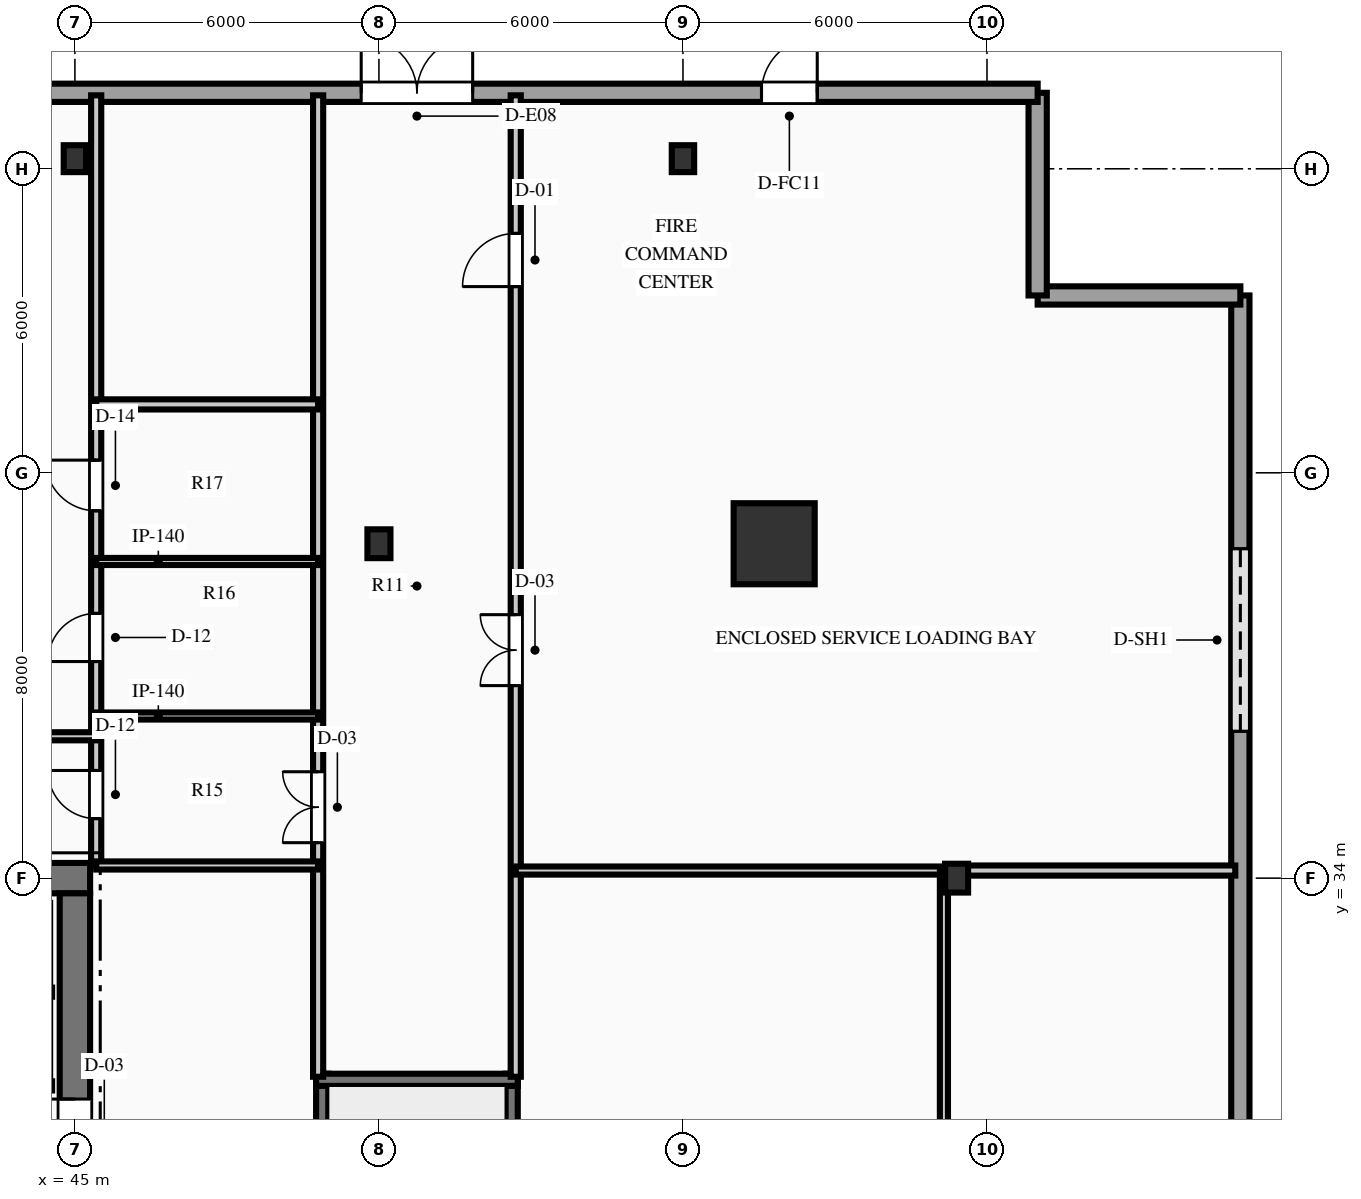
"""IFC4 building model, lengths in metres.
Left out: names, types, materials, properties, quantities, classifications, styles, units other than length and angle.
Written with IfcOpenShell. Run it as: python <this file> out.ifc"""

import sys

from ifc_helpers import new_model, si_unit, direction, frame, frame_2d, origin, origin_2d, place, context, subcontext, project, spatial, rectangle, hollow_rectangle, i_section, extrude, element, fill, save


model = new_model("IFC4")
c1 = context("Model", 3, precision=1e-05, world=origin(), true_north=direction((0.0, 1.0)))
c2 = subcontext(c1, "Body", "Model", "MODEL_VIEW")
j1 = project(units=[si_unit("LENGTHUNIT", "METRE"), si_unit("PLANEANGLEUNIT", "RADIAN")], contexts=[c1])
p1 = place(None, origin())
s1 = spatial("IfcSite", under=j1, at=p1, CompositionType="ELEMENT")
p2 = place(p1, origin())
s2 = spatial("IfcBuilding", under=s1, at=p2, CompositionType="ELEMENT")
p3 = place(p2, origin())
s3 = spatial("IfcBuildingStorey", under=s2, at=p3, CompositionType="ELEMENT", Elevation=0.0)
p4 = place(p3, frame((26.7, 34.0, 0.0), z_axis=(0.0, 0.0, 1.0), x_axis=(1.0, 0.0, 0.0)))
e1 = element("IfcWall", 1, at=p4, inside=s3, PredefinedType="SHEAR", context=c2, shape_type="SweptSolid", body=[
    extrude(rectangle(XDim=18.6, YDim=0.6, at=frame_2d((9.3, 0.0))), origin(), (0.0, 0.0, 1.0), 6.0),
])
p5 = place(p4, frame((5.595, 0.0, 0.0)))
e2 = element("IfcOpeningElement", 2, at=p5, cuts=e1, PredefinedType="OPENING", context=c2, shape_type="SweptSolid", body=[
    extrude(rectangle(XDim=1.05, YDim=2.15, at=frame_2d((0.525, 1.075))), frame((0.0, 0.31, 0.0), z_axis=(0.0, -1.0, 0.0), x_axis=(1.0, 0.0, 0.0)), (0.0, 0.0, 1.0), 0.62),
])
p6 = place(p4, frame((1.265, 0.0, 0.0)))
e3 = element("IfcOpeningElement", 3, at=p6, cuts=e1, PredefinedType="OPENING", context=c2, shape_type="SweptSolid", body=[
    extrude(rectangle(XDim=1.1, YDim=2.15, at=frame_2d((0.55, 1.075))), frame((0.0, 0.31, 0.0), z_axis=(0.0, -1.0, 0.0), x_axis=(1.0, 0.0, 0.0)), (0.0, 0.0, 1.0), 0.62),
])
p7 = place(p4, frame((3.515, 0.0, 0.0)))
e4 = element("IfcOpeningElement", 4, at=p7, cuts=e1, PredefinedType="OPENING", context=c2, shape_type="SweptSolid", body=[
    extrude(rectangle(XDim=1.1, YDim=2.15, at=frame_2d((0.55, 1.075))), frame((0.0, 0.31, 0.0), z_axis=(0.0, -1.0, 0.0), x_axis=(1.0, 0.0, 0.0)), (0.0, 0.0, 1.0), 0.62),
])
p8 = place(p4, frame((13.985, 0.0, 0.0)))
e5 = element("IfcOpeningElement", 5, at=p8, cuts=e1, PredefinedType="OPENING", context=c2, shape_type="SweptSolid", body=[
    extrude(rectangle(XDim=1.1, YDim=2.15, at=frame_2d((0.55, 1.075))), frame((0.0, 0.31, 0.0), z_axis=(0.0, -1.0, 0.0), x_axis=(1.0, 0.0, 0.0)), (0.0, 0.0, 1.0), 0.62),
])
p9 = place(p4, frame((16.235, 0.0, 0.0)))
e6 = element("IfcOpeningElement", 6, at=p9, cuts=e1, PredefinedType="OPENING", context=c2, shape_type="SweptSolid", body=[
    extrude(rectangle(XDim=1.1, YDim=2.15, at=frame_2d((0.55, 1.075))), frame((0.0, 0.31, 0.0), z_axis=(0.0, -1.0, 0.0), x_axis=(1.0, 0.0, 0.0)), (0.0, 0.0, 1.0), 0.62),
])
p10 = place(p3, frame((45.0, 18.3, 0.0), z_axis=(0.0, 0.0, 1.0), x_axis=(0.0, 1.0, 0.0)))
e7 = element("IfcWall", 7, at=p10, inside=s3, PredefinedType="SHEAR", context=c2, shape_type="SweptSolid", body=[
    extrude(rectangle(XDim=15.4, YDim=0.6, at=frame_2d((7.7, 0.0))), origin(), (0.0, 0.0, 1.0), 6.0),
])
p11 = place(p10, frame((9.94, 0.0, 0.0)))
e8 = element("IfcOpeningElement", 8, at=p11, cuts=e7, PredefinedType="OPENING", context=c2, shape_type="SweptSolid", body=[
    extrude(rectangle(XDim=1.4, YDim=2.2, at=frame_2d((0.7, 1.1))), frame((0.0, 0.31, 0.0), z_axis=(0.0, -1.0, 0.0), x_axis=(1.0, 0.0, 0.0)), (0.0, 0.0, 1.0), 0.62),
])
for number, where, z_axis, x_axis in (
    (9, (49.88, 21.76, 0.0), (0.0, 0.0, 1.0), (0.0, 1.0, 0.0)),
    (10, (53.62, 21.76, 0.0), (0.0, 0.0, 1.0), (0.0, 1.0, 0.0)),
):
    element("IfcWall", number, at=place(p3, frame(where, z_axis=z_axis, x_axis=x_axis)), inside=s3, PredefinedType="SHEAR", context=c2, shape_type="SweptSolid", body=[
        extrude(rectangle(XDim=8.38, YDim=0.24, at=frame_2d((4.19, 0.0))), origin(), (0.0, 0.0, 1.0), 6.0),
    ])
p12 = place(p3, frame((49.76, 30.02, 0.0), z_axis=(0.0, 0.0, 1.0), x_axis=(1.0, 0.0, 0.0)))
e11 = element("IfcWall", 11, at=p12, inside=s3, PredefinedType="SHEAR", context=c2, shape_type="SweptSolid", body=[
    extrude(rectangle(XDim=3.98, YDim=0.24, at=frame_2d((1.99, 0.0))), origin(), (0.0, 0.0, 1.0), 6.0),
])
p13 = place(p3, frame((58.8, 40.6, 0.0), z_axis=(0.0, 0.0, 1.0), x_axis=(1.0, 0.0, 0.0)))
e12 = element("IfcColumn", 12, at=p13, inside=s3, PredefinedType="COLUMN", context=c2, shape_type="SweptSolid", body=[
    extrude(hollow_rectangle(XDim=1.6, YDim=1.6, WallThickness=0.08, at=origin_2d()), origin(), (0.0, 0.0, 1.0), 6.0),
])
for number, where, z_axis, x_axis in (
    (13, (62.4, 34.0, 0.0), (0.0, 0.0, 1.0), (1.0, 0.0, 0.0)),
    (14, (51.0, 40.6, 0.0), (0.0, 0.0, 1.0), (1.0, 0.0, 0.0)),
):
    element("IfcColumn", number, at=place(p3, frame(where, z_axis=z_axis, x_axis=x_axis)), inside=s3, PredefinedType="COLUMN", context=c2, shape_type="SweptSolid", body=[
        extrude(i_section(OverallWidth=0.454, OverallDepth=0.569, WebThickness=0.078, FlangeThickness=0.125, at=origin_2d()), origin(), (0.0, 0.0, 1.0), 6.0),
    ])
for number, where, z_axis, x_axis in (
    (15, (57.0, 48.2, 0.0), (0.0, 0.0, 1.0), (1.0, 0.0, 0.0)),
    (16, (45.0, 48.2, 0.0), (0.0, 0.0, 1.0), (1.0, 0.0, 0.0)),
):
    element("IfcColumn", number, at=place(p3, frame(where, z_axis=z_axis, x_axis=x_axis)), inside=s3, PredefinedType="PILASTER", context=c2, shape_type="SweptSolid", body=[
        extrude(i_section(OverallWidth=0.442, OverallDepth=0.531, WebThickness=0.066, FlangeThickness=0.106, at=origin_2d()), origin(), (0.0, 0.0, 1.0), 6.0),
    ])
p14 = place(p3, frame((68.0, 45.5, 0.0), z_axis=(0.0, 0.0, 1.0), x_axis=(0.0, -1.0, 0.0)))
e17 = element("IfcWall", 17, at=p14, inside=s3, PredefinedType="STANDARD", context=c2, shape_type="SweptSolid", body=[
    extrude(rectangle(XDim=39.0, YDim=0.36, at=frame_2d((19.5, 0.0))), origin(), (0.0, 0.0, 1.0), 5.67),
])
p15 = place(p14, frame((30.4, 0.0, 0.0)))
e18 = element("IfcOpeningElement", 18, at=p15, cuts=e17, PredefinedType="OPENING", context=c2, shape_type="SweptSolid", body=[
    extrude(rectangle(XDim=2.2, YDim=2.4, at=frame_2d((1.1, 1.2))), frame((0.0, 0.19, 0.0), z_axis=(0.0, -1.0, 0.0), x_axis=(1.0, 0.0, 0.0)), (0.0, 0.0, 1.0), 0.38),
])
p16 = place(p14, frame((20.3, 0.0, 0.0)))
e19 = element("IfcOpeningElement", 19, at=p16, cuts=e17, PredefinedType="OPENING", context=c2, shape_type="SweptSolid", body=[
    extrude(rectangle(XDim=2.4, YDim=2.6, at=frame_2d((1.2, 1.3))), frame((0.0, 0.19, 0.0), z_axis=(0.0, -1.0, 0.0), x_axis=(1.0, 0.0, 0.0)), (0.0, 0.0, 1.0), 0.38),
])
p17 = place(p14, frame((5.0, 0.0, 0.0)))
e20 = element("IfcOpeningElement", 20, at=p17, cuts=e17, PredefinedType="OPENING", context=c2, shape_type="SweptSolid", body=[
    extrude(rectangle(XDim=3.6, YDim=3.8, at=frame_2d((1.8, 1.9))), frame((0.0, 0.19, 0.0), z_axis=(0.0, -1.0, 0.0), x_axis=(1.0, 0.0, 0.0)), (0.0, 0.0, 1.0), 0.38),
])
for number, where, z_axis, x_axis in (
    (21, (64.0, 45.5, 0.0), (0.0, 0.0, 1.0), (1.0, 0.0, 0.0)),
    (22, (64.0, 49.5, 0.0), (0.0, 0.0, 1.0), (0.0, -1.0, 0.0)),
):
    element("IfcWall", number, at=place(p3, frame(where, z_axis=z_axis, x_axis=x_axis)), inside=s3, PredefinedType="STANDARD", context=c2, shape_type="SweptSolid", body=[
        extrude(rectangle(XDim=4.0, YDim=0.36, at=frame_2d((2.0, 0.0))), origin(), (0.0, 0.0, 1.0), 5.67),
    ])
p18 = place(p3, frame((8.0, 49.5, 0.0), z_axis=(0.0, 0.0, 1.0), x_axis=(1.0, 0.0, 0.0)))
e23 = element("IfcWall", 23, at=p18, inside=s3, PredefinedType="STANDARD", context=c2, shape_type="SweptSolid", body=[
    extrude(rectangle(XDim=56.0, YDim=0.36, at=frame_2d((28.0, 0.0))), origin(), (0.0, 0.0, 1.0), 5.67),
])
p19 = place(p18, frame((11.15, 0.0, 0.0)))
e24 = element("IfcOpeningElement", 24, at=p19, cuts=e23, PredefinedType="OPENING", context=c2, shape_type="SweptSolid", body=[
    extrude(rectangle(XDim=2.2, YDim=2.4, at=frame_2d((1.1, 1.2))), frame((0.0, 0.19, 0.0), z_axis=(0.0, -1.0, 0.0), x_axis=(1.0, 0.0, 0.0)), (0.0, 0.0, 1.0), 0.38),
])
p20 = place(p18, frame((42.65, 0.0, 0.0)))
e25 = element("IfcOpeningElement", 25, at=p20, cuts=e23, PredefinedType="OPENING", context=c2, shape_type="SweptSolid", body=[
    extrude(rectangle(XDim=2.2, YDim=2.4, at=frame_2d((1.1, 1.2))), frame((0.0, 0.19, 0.0), z_axis=(0.0, -1.0, 0.0), x_axis=(1.0, 0.0, 0.0)), (0.0, 0.0, 1.0), 0.38),
])
p21 = place(p18, frame((26.8, 0.0, 0.0)))
e26 = element("IfcOpeningElement", 26, at=p21, cuts=e23, PredefinedType="OPENING", context=c2, shape_type="SweptSolid", body=[
    extrude(rectangle(XDim=2.4, YDim=2.6, at=frame_2d((1.2, 1.3))), frame((0.0, 0.19, 0.0), z_axis=(0.0, -1.0, 0.0), x_axis=(1.0, 0.0, 0.0)), (0.0, 0.0, 1.0), 0.38),
])
p22 = place(p18, frame((50.55, 0.0, 0.0)))
e27 = element("IfcOpeningElement", 27, at=p22, cuts=e23, PredefinedType="OPENING", context=c2, shape_type="SweptSolid", body=[
    extrude(rectangle(XDim=1.1, YDim=2.2, at=frame_2d((0.55, 1.1))), frame((0.0, 0.19, 0.0), z_axis=(0.0, -1.0, 0.0), x_axis=(1.0, 0.0, 0.0)), (0.0, 0.0, 1.0), 0.38),
])
p23 = place(p3, frame((49.8, 30.08, 0.0), z_axis=(0.0, 0.0, 1.0), x_axis=(0.0, 1.0, 0.0)))
e28 = element("IfcWall", 28, at=p23, inside=s3, PredefinedType="PARTITIONING", context=c2, shape_type="SweptSolid", body=[
    extrude(rectangle(XDim=19.37, YDim=0.2, at=frame_2d((9.685, 0.0))), origin(), (0.0, 0.0, 1.0), 5.67),
])
p24 = place(p23, frame((4.62, 0.0, 0.0)))
e29 = element("IfcOpeningElement", 29, at=p24, cuts=e28, PredefinedType="OPENING", context=c2, shape_type="SweptSolid", body=[
    extrude(rectangle(XDim=1.4, YDim=2.2, at=frame_2d((0.7, 1.1))), frame((0.0, 0.11, 0.0), z_axis=(0.0, -1.0, 0.0), x_axis=(1.0, 0.0, 0.0)), (0.0, 0.0, 1.0), 0.22),
])
p25 = place(p3, frame((53.7, 30.08, 0.0), z_axis=(0.0, 0.0, 1.0), x_axis=(0.0, 1.0, 0.0)))
e30 = element("IfcWall", 30, at=p25, inside=s3, PredefinedType="PARTITIONING", context=c2, shape_type="SweptSolid", body=[
    extrude(rectangle(XDim=19.37, YDim=0.2, at=frame_2d((9.685, 0.0))), origin(), (0.0, 0.0, 1.0), 5.67),
])
p26 = place(p25, frame((15.595, 0.0, 0.0)))
e31 = element("IfcOpeningElement", 31, at=p26, cuts=e30, PredefinedType="OPENING", context=c2, shape_type="SweptSolid", body=[
    extrude(rectangle(XDim=1.05, YDim=2.15, at=frame_2d((0.525, 1.075))), frame((0.0, 0.11, 0.0), z_axis=(0.0, -1.0, 0.0), x_axis=(1.0, 0.0, 0.0)), (0.0, 0.0, 1.0), 0.22),
])
p27 = place(p25, frame((7.72, 0.0, 0.0)))
e32 = element("IfcOpeningElement", 32, at=p27, cuts=e30, PredefinedType="OPENING", context=c2, shape_type="SweptSolid", body=[
    extrude(rectangle(XDim=1.4, YDim=2.2, at=frame_2d((0.7, 1.1))), frame((0.0, 0.11, 0.0), z_axis=(0.0, -1.0, 0.0), x_axis=(1.0, 0.0, 0.0)), (0.0, 0.0, 1.0), 0.22),
])
p28 = place(p3, frame((53.7, 34.15, 0.0), z_axis=(0.0, 0.0, 1.0), x_axis=(1.0, 0.0, 0.0)))
e33 = element("IfcWall", 33, at=p28, inside=s3, PredefinedType="PARTITIONING", context=c2, shape_type="SweptSolid", body=[
    extrude(rectangle(XDim=8.45, YDim=0.16, at=frame_2d((4.225, 0.0))), origin(), (0.0, 0.0, 1.0), 4.803),
])
p29 = place(p3, frame((62.15, 17.85, 0.0), z_axis=(0.0, 0.0, 1.0), x_axis=(0.0, 1.0, 0.0)))
e34 = element("IfcWall", 34, at=p29, inside=s3, PredefinedType="PARTITIONING", context=c2, shape_type="SweptSolid", body=[
    extrude(rectangle(XDim=16.3, YDim=0.16, at=frame_2d((8.15, 0.0))), origin(), (0.0, 0.0, 1.0), 4.803),
])
p30 = place(p29, frame((7.35, 0.0, 0.0)))
e35 = element("IfcOpeningElement", 35, at=p30, cuts=e34, PredefinedType="OPENING", context=c2, shape_type="SweptSolid", body=[
    extrude(rectangle(XDim=1.6, YDim=2.2, at=frame_2d((0.8, 1.1))), frame((0.0, 0.09, 0.0), z_axis=(0.0, -1.0, 0.0), x_axis=(1.0, 0.0, 0.0)), (0.0, 0.0, 1.0), 0.18),
])
p31 = place(p3, frame((45.42, 34.25, 0.0), z_axis=(0.0, 0.0, 1.0), x_axis=(0.0, 1.0, 0.0)))
e36 = element("IfcWall", 36, at=p31, inside=s3, PredefinedType="PARTITIONING", context=c2, shape_type="SweptSolid", body=[
    extrude(rectangle(XDim=15.2, YDim=0.2, at=frame_2d((7.6, 0.0))), origin(), (0.0, 0.0, 1.0), 4.803),
])
p32 = place(p31, frame((0.925, 0.0, 0.0)))
e37 = element("IfcOpeningElement", 37, at=p32, cuts=e36, PredefinedType="OPENING", context=c2, shape_type="SweptSolid", body=[
    extrude(rectangle(XDim=0.95, YDim=2.15, at=frame_2d((0.475, 1.075))), frame((0.0, 0.11, 0.0), z_axis=(0.0, -1.0, 0.0), x_axis=(1.0, 0.0, 0.0)), (0.0, 0.0, 1.0), 0.22),
])
p33 = place(p31, frame((4.025, 0.0, 0.0)))
e38 = element("IfcOpeningElement", 38, at=p33, cuts=e36, PredefinedType="OPENING", context=c2, shape_type="SweptSolid", body=[
    extrude(rectangle(XDim=0.95, YDim=2.15, at=frame_2d((0.475, 1.075))), frame((0.0, 0.11, 0.0), z_axis=(0.0, -1.0, 0.0), x_axis=(1.0, 0.0, 0.0)), (0.0, 0.0, 1.0), 0.22),
])
p34 = place(p31, frame((7.0, 0.0, 0.0)))
e39 = element("IfcOpeningElement", 39, at=p34, cuts=e36, PredefinedType="OPENING", context=c2, shape_type="SweptSolid", body=[
    extrude(rectangle(XDim=1.0, YDim=2.15, at=frame_2d((0.5, 1.075))), frame((0.0, 0.11, 0.0), z_axis=(0.0, -1.0, 0.0), x_axis=(1.0, 0.0, 0.0)), (0.0, 0.0, 1.0), 0.22),
])
p35 = place(p3, frame((45.42, 43.35, 0.0), z_axis=(0.0, 0.0, 1.0), x_axis=(1.0, 0.0, 0.0)))
e40 = element("IfcWall", 40, at=p35, inside=s3, PredefinedType="PARTITIONING", context=c2, shape_type="SweptSolid", body=[
    extrude(rectangle(XDim=4.38, YDim=0.2, at=frame_2d((2.19, 0.0))), origin(), (0.0, 0.0, 1.0), 5.67),
])
p36 = place(p3, frame((45.42, 34.25, 0.0), z_axis=(0.0, 0.0, 1.0), x_axis=(1.0, 0.0, 0.0)))
e41 = element("IfcWall", 41, at=p36, inside=s3, PredefinedType="PARTITIONING", context=c2, shape_type="SweptSolid", body=[
    extrude(rectangle(XDim=4.38, YDim=0.16, at=frame_2d((2.19, 0.0))), origin(), (0.0, 0.0, 1.0), 4.803),
])
for number, where, z_axis, x_axis in (
    (42, (45.42, 37.2, 0.0), (0.0, 0.0, 1.0), (1.0, 0.0, 0.0)),
    (43, (45.42, 40.25, 0.0), (0.0, 0.0, 1.0), (1.0, 0.0, 0.0)),
):
    element("IfcWall", number, at=place(p3, frame(where, z_axis=z_axis, x_axis=x_axis)), inside=s3, PredefinedType="PARTITIONING", context=c2, shape_type="SweptSolid", body=[
        extrude(rectangle(XDim=4.38, YDim=0.14, at=frame_2d((2.19, 0.0))), origin(), (0.0, 0.0, 1.0), 5.67),
    ])
p37 = place(p3, frame((22.2, 36.8, 0.0), z_axis=(0.0, 0.0, 1.0), x_axis=(1.0, 0.0, 0.0)))
e44 = element("IfcWall", 44, at=p37, inside=s3, PredefinedType="PARTITIONING", context=c2, shape_type="SweptSolid", body=[
    extrude(rectangle(XDim=23.22, YDim=0.16, at=frame_2d((11.61, 0.0))), origin(), (0.0, 0.0, 1.0), 5.67),
])
p38 = place(p37, frame((7.0, 0.0, 0.0)))
e45 = element("IfcOpeningElement", 45, at=p38, cuts=e44, PredefinedType="OPENING", context=c2, shape_type="SweptSolid", body=[
    extrude(rectangle(XDim=1.6, YDim=2.2, at=frame_2d((0.8, 1.1))), frame((0.0, 0.09, 0.0), z_axis=(0.0, -1.0, 0.0), x_axis=(1.0, 0.0, 0.0)), (0.0, 0.0, 1.0), 0.18),
])
p39 = place(p3, frame((62.25, 34.15, 0.0), z_axis=(0.0, 0.0, 1.0), x_axis=(1.0, 0.0, 0.0)))
e46 = element("IfcWall", 46, at=p39, inside=s3, PredefinedType="PARTITIONING", context=c2, shape_type="SweptSolid", body=[
    extrude(rectangle(XDim=5.65, YDim=0.2, at=frame_2d((2.825, 0.0))), origin(), (0.0, 0.0, 1.0), 4.803),
])
p40 = place(p17, origin())
e47 = element("IfcDoor", 47, at=p40, inside=s3, OperationType="ROLLINGUP", PredefinedType="GATE", context=c2, shape_type="SweptSolid", body=[
    extrude(rectangle(XDim=3.6, YDim=3.8, at=frame_2d((1.8, 1.9))), frame((0.0, 0.025, 0.0), z_axis=(0.0, -1.0, 0.0), x_axis=(1.0, 0.0, 0.0)), (0.0, 0.0, 1.0), 0.05),
])
fill(e20, e47)
p41 = place(p20, origin())
e48 = element("IfcDoor", 48, at=p41, inside=s3, OperationType="DOUBLE_DOOR_SINGLE_SWING", PredefinedType="DOOR", context=c2, shape_type="SweptSolid", body=[
    extrude(rectangle(XDim=2.2, YDim=2.4, at=frame_2d((1.1, 1.2))), frame((0.0, 0.025, 0.0), z_axis=(0.0, -1.0, 0.0), x_axis=(1.0, 0.0, 0.0)), (0.0, 0.0, 1.0), 0.05),
])
fill(e25, e48)
p42 = place(p22, origin())
e49 = element("IfcDoor", 49, at=p42, inside=s3, OperationType="SINGLE_SWING_RIGHT", PredefinedType="DOOR", context=c2, shape_type="SweptSolid", body=[
    extrude(rectangle(XDim=1.1, YDim=2.2, at=frame_2d((0.55, 1.1))), frame((0.0, 0.025, 0.0), z_axis=(0.0, -1.0, 0.0), x_axis=(1.0, 0.0, 0.0)), (0.0, 0.0, 1.0), 0.05),
])
fill(e27, e49)
p43 = place(p11, origin())
e50 = element("IfcDoor", 50, at=p43, inside=s3, OperationType="DOUBLE_DOOR_SINGLE_SWING", PredefinedType="DOOR", context=c2, shape_type="SweptSolid", body=[
    extrude(rectangle(XDim=1.4, YDim=2.2, at=frame_2d((0.7, 1.1))), frame((0.0, 0.025, 0.0), z_axis=(0.0, -1.0, 0.0), x_axis=(1.0, 0.0, 0.0)), (0.0, 0.0, 1.0), 0.05),
])
fill(e8, e50)
p44 = place(p24, origin())
e51 = element("IfcDoor", 51, at=p44, inside=s3, OperationType="DOUBLE_DOOR_SINGLE_SWING", PredefinedType="DOOR", context=c2, shape_type="SweptSolid", body=[
    extrude(rectangle(XDim=1.4, YDim=2.2, at=frame_2d((0.7, 1.1))), frame((0.0, 0.025, 0.0), z_axis=(0.0, -1.0, 0.0), x_axis=(1.0, 0.0, 0.0)), (0.0, 0.0, 1.0), 0.05),
])
fill(e29, e51)
p45 = place(p26, origin())
e52 = element("IfcDoor", 52, at=p45, inside=s3, OperationType="SINGLE_SWING_LEFT", PredefinedType="DOOR", context=c2, shape_type="SweptSolid", body=[
    extrude(rectangle(XDim=1.05, YDim=2.15, at=frame_2d((0.525, 1.075))), frame((0.0, 0.025, 0.0), z_axis=(0.0, -1.0, 0.0), x_axis=(1.0, 0.0, 0.0)), (0.0, 0.0, 1.0), 0.05),
])
fill(e31, e52)
p46 = place(p27, origin())
e53 = element("IfcDoor", 53, at=p46, inside=s3, OperationType="DOUBLE_DOOR_SINGLE_SWING", PredefinedType="DOOR", context=c2, shape_type="SweptSolid", body=[
    extrude(rectangle(XDim=1.4, YDim=2.2, at=frame_2d((0.7, 1.1))), frame((0.0, 0.025, 0.0), z_axis=(0.0, -1.0, 0.0), x_axis=(1.0, 0.0, 0.0)), (0.0, 0.0, 1.0), 0.05),
])
fill(e32, e53)
p47 = place(p32, origin())
e54 = element("IfcDoor", 54, at=p47, inside=s3, OperationType="SINGLE_SWING_RIGHT", PredefinedType="DOOR", context=c2, shape_type="SweptSolid", body=[
    extrude(rectangle(XDim=0.95, YDim=2.15, at=frame_2d((0.475, 1.075))), frame((0.0, 0.025, 0.0), z_axis=(0.0, -1.0, 0.0), x_axis=(1.0, 0.0, 0.0)), (0.0, 0.0, 1.0), 0.05),
])
fill(e37, e54)
p48 = place(p33, origin())
e55 = element("IfcDoor", 55, at=p48, inside=s3, OperationType="SINGLE_SWING_LEFT", PredefinedType="DOOR", context=c2, shape_type="SweptSolid", body=[
    extrude(rectangle(XDim=0.95, YDim=2.15, at=frame_2d((0.475, 1.075))), frame((0.0, 0.025, 0.0), z_axis=(0.0, -1.0, 0.0), x_axis=(1.0, 0.0, 0.0)), (0.0, 0.0, 1.0), 0.05),
])
fill(e38, e55)
p49 = place(p34, origin())
e56 = element("IfcDoor", 56, at=p49, inside=s3, OperationType="SINGLE_SWING_RIGHT", PredefinedType="DOOR", context=c2, shape_type="SweptSolid", body=[
    extrude(rectangle(XDim=1.0, YDim=2.15, at=frame_2d((0.5, 1.075))), frame((0.0, 0.025, 0.0), z_axis=(0.0, -1.0, 0.0), x_axis=(1.0, 0.0, 0.0)), (0.0, 0.0, 1.0), 0.05),
])
fill(e39, e56)
save(model, sys.argv[1])
